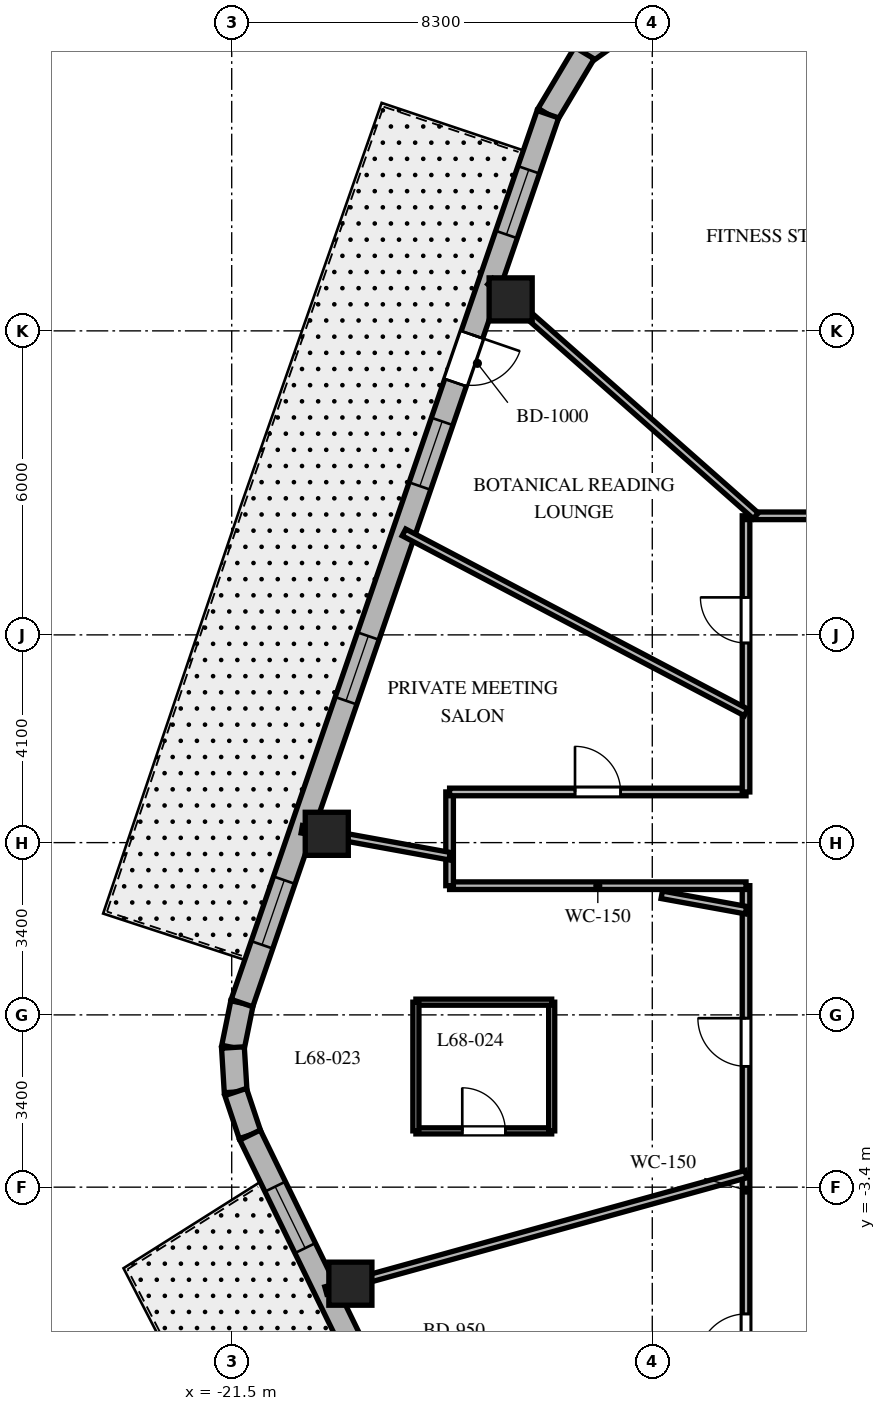
"""IFC4 building model, lengths in metres.
Left out: names, types, materials, properties, quantities, classifications, styles, units other than length and angle.
Written with IfcOpenShell. Run it as: python <this file> out.ifc"""

import sys

from ifc_helpers import new_model, si_unit, direction, frame, frame_2d, origin, origin_2d, place, context, subcontext, project, spatial, rectangle, extrude, element, fill, save


model = new_model("IFC4")
c1 = context("Model", 3, precision=1e-05, world=origin(), true_north=direction((0.0, 1.0)))
c2 = subcontext(c1, "Body", "Model", "MODEL_VIEW")
j1 = project(units=[si_unit("LENGTHUNIT", "METRE"), si_unit("PLANEANGLEUNIT", "RADIAN")], contexts=[c1])
p1 = place(None, origin())
s1 = spatial("IfcSite", under=j1, at=p1, CompositionType="ELEMENT")
p2 = place(p1, origin())
s2 = spatial("IfcBuilding", under=s1, at=p2, CompositionType="ELEMENT")
p3 = place(p2, frame((0.0, 0.0, 273.0)))
s3 = spatial("IfcBuildingStorey", under=s2, at=p3, CompositionType="ELEMENT", Elevation=273.0)
for number, where, z_axis, x_axis in (
    (1, (-15.995, 14.121, 0.0), (0.0, 0.0, 1.0), (1.0, 0.0, 0.0)),
    (2, (-19.624, 3.574, 0.0), (0.0, 0.0, 1.0), (1.0, 0.0, 0.0)),
    (3, (-19.158, -5.305, 0.0), (0.0, 0.0, 1.0), (1.0, 0.0, 0.0)),
):
    element("IfcColumn", number, at=place(p3, frame(where, z_axis=z_axis, x_axis=x_axis)), inside=s3, PredefinedType="COLUMN", context=c2, shape_type="SweptSolid", body=[
        extrude(rectangle(XDim=0.85, YDim=0.85, at=origin_2d()), origin(), (0.0, 0.0, 1.0), 3.9),
    ])
p4 = place(p3, frame((-13.415, 19.787, 0.0), z_axis=(0.0, 0.0, 1.0), x_axis=(-0.814055493997, -0.580787097561, 0.0)))
e4 = element("IfcWall", 4, at=p4, inside=s3, PredefinedType="SOLIDWALL", context=c2, shape_type="SweptSolid", body=[
    extrude(rectangle(XDim=1.383, YDim=0.45, at=frame_2d((0.691, 0.0))), origin(), (0.0, 0.0, 1.0), 3.6),
])
p5 = place(p3, frame((-14.54, 18.984, 0.0), z_axis=(0.0, 0.0, 1.0), x_axis=(-0.512374906623, -0.858761873317, 0.0)))
e5 = element("IfcWall", 5, at=p5, inside=s3, PredefinedType="SOLIDWALL", context=c2, shape_type="SweptSolid", body=[
    extrude(rectangle(XDim=1.406, YDim=0.45, at=frame_2d((0.703, 0.0))), origin(), (0.0, 0.0, 1.0), 3.6),
])
p6 = place(p3, frame((-21.298, 0.233, 0.0), z_axis=(0.0, 0.0, 1.0), x_axis=(-0.199158176661, -0.979967356941, 0.0)))
e6 = element("IfcWall", 6, at=p6, inside=s3, PredefinedType="SOLIDWALL", context=c2, shape_type="SweptSolid", body=[
    extrude(rectangle(XDim=0.895, YDim=0.45, at=frame_2d((0.447, 0.0))), origin(), (0.0, 0.0, 1.0), 3.6),
])
p7 = place(p3, frame((-21.476, -0.644, 0.0), z_axis=(0.0, 0.0, 1.0), x_axis=(0.061031097918, -0.998135865044, 0.0)))
e7 = element("IfcWall", 7, at=p7, inside=s3, PredefinedType="SOLIDWALL", context=c2, shape_type="SweptSolid", body=[
    extrude(rectangle(XDim=0.88, YDim=0.45, at=frame_2d((0.44, 0.0))), origin(), (0.0, 0.0, 1.0), 3.6),
])
p8 = place(p3, frame((-21.422, -1.522, 0.0), z_axis=(0.0, 0.0, 1.0), x_axis=(0.316964162323, -0.94843751497, 0.0)))
e8 = element("IfcWall", 8, at=p8, inside=s3, PredefinedType="SOLIDWALL", context=c2, shape_type="SweptSolid", body=[
    extrude(rectangle(XDim=0.895, YDim=0.45, at=frame_2d((0.448, 0.0))), origin(), (0.0, 0.0, 1.0), 3.6),
])
p9 = place(p3, frame((-15.26, 17.776, 0.0), z_axis=(0.0, 0.0, 1.0), x_axis=(-0.325407437101, -0.945573899745, 0.0)))
e9 = element("IfcWall", 9, at=p9, inside=s3, PredefinedType="SOLIDWALL", context=c2, shape_type="SweptSolid", body=[
    extrude(rectangle(XDim=18.552, YDim=0.45, at=frame_2d((9.276, 0.0))), origin(), (0.0, 0.0, 1.0), 3.6),
])
p10 = place(p9, frame((4.602, 0.0, 0.0)))
e10 = element("IfcOpeningElement", 10, at=p10, cuts=e9, PredefinedType="OPENING", context=c2, shape_type="SweptSolid", body=[
    extrude(rectangle(XDim=1.0, YDim=2.15, at=frame_2d((0.5, 1.075))), frame((0.0, 0.235, 0.0), z_axis=(0.0, -1.0, 0.0), x_axis=(1.0, 0.0, 0.0)), (0.0, 0.0, 1.0), 0.47),
])
p11 = place(p9, frame((1.161, 0.0, 0.8)))
e11 = element("IfcOpeningElement", 11, at=p11, cuts=e9, PredefinedType="OPENING", context=c2, shape_type="SweptSolid", body=[
    extrude(rectangle(XDim=1.35, YDim=1.75, at=frame_2d((0.675, 0.875))), frame((0.0, 0.235, 0.0), z_axis=(0.0, -1.0, 0.0), x_axis=(1.0, 0.0, 0.0)), (0.0, 0.0, 1.0), 0.47),
])
p12 = place(p9, frame((6.412, 0.0, 0.8)))
e12 = element("IfcOpeningElement", 12, at=p12, cuts=e9, PredefinedType="OPENING", context=c2, shape_type="SweptSolid", body=[
    extrude(rectangle(XDim=1.35, YDim=1.75, at=frame_2d((0.675, 0.875))), frame((0.0, 0.235, 0.0), z_axis=(0.0, -1.0, 0.0), x_axis=(1.0, 0.0, 0.0)), (0.0, 0.0, 1.0), 0.47),
])
p13 = place(p9, frame((10.892, 0.0, 0.8)))
e13 = element("IfcOpeningElement", 13, at=p13, cuts=e9, PredefinedType="OPENING", context=c2, shape_type="SweptSolid", body=[
    extrude(rectangle(XDim=1.35, YDim=1.75, at=frame_2d((0.675, 0.875))), frame((0.0, 0.235, 0.0), z_axis=(0.0, -1.0, 0.0), x_axis=(1.0, 0.0, 0.0)), (0.0, 0.0, 1.0), 0.47),
])
p14 = place(p9, frame((15.987, 0.0, 0.8)))
e14 = element("IfcOpeningElement", 14, at=p14, cuts=e9, PredefinedType="OPENING", context=c2, shape_type="SweptSolid", body=[
    extrude(rectangle(XDim=1.35, YDim=1.75, at=frame_2d((0.675, 0.875))), frame((0.0, 0.235, 0.0), z_axis=(0.0, -1.0, 0.0), x_axis=(1.0, 0.0, 0.0)), (0.0, 0.0, 1.0), 0.47),
])
p15 = place(p3, frame((-21.138, -2.371, 0.0), z_axis=(0.0, 0.0, 1.0), x_axis=(0.438128124058, -0.89891253574, 0.0)))
e15 = element("IfcWall", 15, at=p15, inside=s3, PredefinedType="SOLIDWALL", context=c2, shape_type="SweptSolid", body=[
    extrude(rectangle(XDim=17.565, YDim=0.45, at=frame_2d((8.782, 0.0))), origin(), (0.0, 0.0, 1.0), 3.6),
])
p16 = place(p15, frame((4.769, 0.0, 0.0)))
e16 = element("IfcOpeningElement", 16, at=p16, cuts=e15, PredefinedType="OPENING", context=c2, shape_type="SweptSolid", body=[
    extrude(rectangle(XDim=0.95, YDim=2.15, at=frame_2d((0.475, 1.075))), frame((0.0, 0.235, 0.0), z_axis=(0.0, -1.0, 0.0), x_axis=(1.0, 0.0, 0.0)), (0.0, 0.0, 1.0), 0.47),
])
p17 = place(p15, frame((1.133, 0.0, 0.8)))
e17 = element("IfcOpeningElement", 17, at=p17, cuts=e15, PredefinedType="OPENING", context=c2, shape_type="SweptSolid", body=[
    extrude(rectangle(XDim=1.35, YDim=1.75, at=frame_2d((0.675, 0.875))), frame((0.0, 0.235, 0.0), z_axis=(0.0, -1.0, 0.0), x_axis=(1.0, 0.0, 0.0)), (0.0, 0.0, 1.0), 0.47),
])
p18 = place(p15, frame((8.158, 0.0, 0.8)))
e18 = element("IfcOpeningElement", 18, at=p18, cuts=e15, PredefinedType="OPENING", context=c2, shape_type="SweptSolid", body=[
    extrude(rectangle(XDim=1.35, YDim=1.75, at=frame_2d((0.675, 0.875))), frame((0.0, 0.235, 0.0), z_axis=(0.0, -1.0, 0.0), x_axis=(1.0, 0.0, 0.0)), (0.0, 0.0, 1.0), 0.47),
])
p19 = place(p15, frame((15.132, 0.0, 0.8)))
e19 = element("IfcOpeningElement", 19, at=p19, cuts=e15, PredefinedType="OPENING", context=c2, shape_type="SweptSolid", body=[
    extrude(rectangle(XDim=1.35, YDim=1.75, at=frame_2d((0.675, 0.875))), frame((0.0, 0.235, 0.0), z_axis=(0.0, -1.0, 0.0), x_axis=(1.0, 0.0, 0.0)), (0.0, 0.0, 1.0), 0.47),
])
p20 = place(p3, frame((-11.35, -9.85, 0.0), z_axis=(0.0, 0.0, 1.0), x_axis=(0.0, 1.0, 0.0)))
e20 = element("IfcWall", 20, at=p20, inside=s3, PredefinedType="PARTITIONING", context=c2, shape_type="SweptSolid", body=[
    extrude(rectangle(XDim=12.4, YDim=0.15, at=frame_2d((6.2, 0.0))), origin(), (0.0, 0.0, 1.0), 3.09),
])
p21 = place(p20, frame((8.835, 0.0, 0.0)))
e21 = element("IfcOpeningElement", 21, at=p21, cuts=e20, PredefinedType="OPENING", context=c2, shape_type="SweptSolid", body=[
    extrude(rectangle(XDim=0.95, YDim=2.03, at=frame_2d((0.475, 1.015))), frame((0.0, 0.085, 0.0), z_axis=(0.0, -1.0, 0.0), x_axis=(1.0, 0.0, 0.0)), (0.0, 0.0, 1.0), 0.17),
])
p22 = place(p20, frame((2.998, 0.0, 0.0)))
e22 = element("IfcOpeningElement", 22, at=p22, cuts=e20, PredefinedType="OPENING", context=c2, shape_type="SweptSolid", body=[
    extrude(rectangle(XDim=0.95, YDim=2.03, at=frame_2d((0.475, 1.015))), frame((0.0, 0.085, 0.0), z_axis=(0.0, -1.0, 0.0), x_axis=(1.0, 0.0, 0.0)), (0.0, 0.0, 1.0), 0.17),
])
p23 = place(p3, frame((-11.35, 2.55, 0.0), z_axis=(0.0, 0.0, 1.0), x_axis=(-1.0, 0.0, 0.0)))
e23 = element("IfcWall", 23, at=p23, inside=s3, PredefinedType="PARTITIONING", context=c2, shape_type="SweptSolid", body=[
    extrude(rectangle(XDim=5.85, YDim=0.15, at=frame_2d((2.925, 0.0))), origin(), (0.0, 0.0, 1.0), 3.041),
])
p24 = place(p3, frame((-17.2, 2.55, 0.0), z_axis=(0.0, 0.0, 1.0), x_axis=(0.0, 1.0, 0.0)))
e24 = element("IfcWall", 24, at=p24, inside=s3, PredefinedType="PARTITIONING", context=c2, shape_type="SweptSolid", body=[
    extrude(rectangle(XDim=1.85, YDim=0.15, at=frame_2d((0.925, 0.0))), origin(), (0.0, 0.0, 1.0), 3.09),
])
p25 = place(p3, frame((-17.2, 4.4, 0.0), z_axis=(0.0, 0.0, 1.0), x_axis=(1.0, 0.0, 0.0)))
e25 = element("IfcWall", 25, at=p25, inside=s3, PredefinedType="PARTITIONING", context=c2, shape_type="SweptSolid", body=[
    extrude(rectangle(XDim=5.85, YDim=0.15, at=frame_2d((2.925, 0.0))), origin(), (0.0, 0.0, 1.0), 3.041),
])
p26 = place(p25, frame((2.475, 0.0, 0.0)))
e26 = element("IfcOpeningElement", 26, at=p26, cuts=e25, PredefinedType="OPENING", context=c2, shape_type="SweptSolid", body=[
    extrude(rectangle(XDim=0.9, YDim=2.03, at=frame_2d((0.45, 1.015))), frame((0.0, 0.085, 0.0), z_axis=(0.0, -1.0, 0.0), x_axis=(1.0, 0.0, 0.0)), (0.0, 0.0, 1.0), 0.17),
])
p27 = place(p3, frame((-11.35, 4.4, 0.0), z_axis=(0.0, 0.0, 1.0), x_axis=(0.0, 1.0, 0.0)))
e27 = element("IfcWall", 27, at=p27, inside=s3, PredefinedType="PARTITIONING", context=c2, shape_type="SweptSolid", body=[
    extrude(rectangle(XDim=5.45, YDim=0.15, at=frame_2d((2.725, 0.0))), origin(), (0.0, 0.0, 1.0), 3.09),
])
p28 = place(p27, frame((2.94, 0.0, 0.0)))
e28 = element("IfcOpeningElement", 28, at=p28, cuts=e27, PredefinedType="OPENING", context=c2, shape_type="SweptSolid", body=[
    extrude(rectangle(XDim=0.9, YDim=2.03, at=frame_2d((0.45, 1.015))), frame((0.0, 0.085, 0.0), z_axis=(0.0, -1.0, 0.0), x_axis=(1.0, 0.0, 0.0)), (0.0, 0.0, 1.0), 0.17),
])
p29 = place(p3, frame((-11.35, 9.85, 0.0), z_axis=(0.0, 0.0, 1.0), x_axis=(1.0, 0.0, 0.0)))
e29 = element("IfcWall", 29, at=p29, inside=s3, PredefinedType="PARTITIONING", context=c2, shape_type="SweptSolid", body=[
    extrude(rectangle(XDim=10.43, YDim=0.15, at=frame_2d((5.215, 0.0))), origin(), (0.0, 0.0, 1.0), 3.09),
])
p30 = place(p29, frame((8.407, 0.0, 0.0)))
e30 = element("IfcOpeningElement", 30, at=p30, cuts=e29, PredefinedType="OPENING", context=c2, shape_type="SweptSolid", body=[
    extrude(rectangle(XDim=0.9, YDim=2.03, at=frame_2d((0.45, 1.015))), frame((0.0, 0.085, 0.0), z_axis=(0.0, -1.0, 0.0), x_axis=(1.0, 0.0, 0.0)), (0.0, 0.0, 1.0), 0.17),
])
p31 = place(p29, frame((3.416, 0.0, 0.0)))
e31 = element("IfcOpeningElement", 31, at=p31, cuts=e29, PredefinedType="OPENING", context=c2, shape_type="SweptSolid", body=[
    extrude(rectangle(XDim=0.95, YDim=2.03, at=frame_2d((0.475, 1.015))), frame((0.0, 0.085, 0.0), z_axis=(0.0, -1.0, 0.0), x_axis=(1.0, 0.0, 0.0)), (0.0, 0.0, 1.0), 0.17),
])
p32 = place(p3, frame((-11.157, 9.85, 0.0), z_axis=(0.0, 0.0, 1.0), x_axis=(-0.74966962095, 0.661812253909, 0.0)))
e32 = element("IfcWall", 32, at=p32, inside=s3, PredefinedType="PARTITIONING", context=c2, shape_type="SweptSolid", body=[
    extrude(rectangle(XDim=6.989, YDim=0.15, at=frame_2d((3.494, 0.0))), origin(), (0.0, 0.0, 1.0), 2.94),
])
p33 = place(p3, frame((-11.35, 5.971, 0.0), z_axis=(0.0, 0.0, 1.0), x_axis=(-0.884999439042, 0.465592088523, 0.0)))
e33 = element("IfcWall", 33, at=p33, inside=s3, PredefinedType="PARTITIONING", context=c2, shape_type="SweptSolid", body=[
    extrude(rectangle(XDim=7.628, YDim=0.15, at=frame_2d((3.814, 0.0))), origin(), (0.0, 0.0, 1.0), 2.94),
])
p34 = place(p3, frame((-11.35, 2.067, 0.0), z_axis=(0.0, 0.0, 1.0), x_axis=(-0.983807459651, 0.179228575665, 0.0)))
e34 = element("IfcWall", 34, at=p34, inside=s3, PredefinedType="PARTITIONING", context=c2, shape_type="SweptSolid", body=[
    extrude(rectangle(XDim=1.69, YDim=0.15, at=frame_2d((0.845, 0.0))), origin(), (0.0, 0.0, 1.0), 3.6),
])
p35 = place(p3, frame((-17.2, 3.133, 0.0), z_axis=(0.0, 0.0, 1.0), x_axis=(-0.983817168797, 0.179175272791, 0.0)))
e35 = element("IfcWall", 35, at=p35, inside=s3, PredefinedType="PARTITIONING", context=c2, shape_type="SweptSolid", body=[
    extrude(rectangle(XDim=2.965, YDim=0.15, at=frame_2d((1.482, 0.0))), origin(), (0.0, 0.0, 1.0), 2.94),
])
p36 = place(p3, frame((-11.35, -3.143, 0.0), z_axis=(0.0, 0.0, 1.0), x_axis=(-0.963731818141, -0.266872596386, 0.0)))
e36 = element("IfcWall", 36, at=p36, inside=s3, PredefinedType="PARTITIONING", context=c2, shape_type="SweptSolid", body=[
    extrude(rectangle(XDim=8.605, YDim=0.15, at=frame_2d((4.302, 0.0))), origin(), (0.0, 0.0, 1.0), 2.94),
])
p37 = place(p3, frame((-17.865, -2.289, 0.0), z_axis=(0.0, 0.0, 1.0), x_axis=(1.0, 0.0, 0.0)))
e37 = element("IfcWall", 37, at=p37, inside=s3, PredefinedType="PARTITIONING", context=c2, shape_type="SweptSolid", body=[
    extrude(rectangle(XDim=2.68, YDim=0.12, at=frame_2d((1.34, 0.0))), origin(), (0.0, 0.0, 1.0), 3.041),
])
p38 = place(p37, frame((0.915, 0.0, 0.0)))
e38 = element("IfcOpeningElement", 38, at=p38, cuts=e37, PredefinedType="OPENING", context=c2, shape_type="SweptSolid", body=[
    extrude(rectangle(XDim=0.85, YDim=2.03, at=frame_2d((0.425, 1.015))), frame((0.0, 0.07, 0.0), z_axis=(0.0, -1.0, 0.0), x_axis=(1.0, 0.0, 0.0)), (0.0, 0.0, 1.0), 0.14),
])
p39 = place(p3, frame((-15.185, -2.289, 0.0), z_axis=(0.0, 0.0, 1.0), x_axis=(0.0, 1.0, 0.0)))
e39 = element("IfcWall", 39, at=p39, inside=s3, PredefinedType="PARTITIONING", context=c2, shape_type="SweptSolid", body=[
    extrude(rectangle(XDim=2.54, YDim=0.12, at=frame_2d((1.27, 0.0))), origin(), (0.0, 0.0, 1.0), 3.6),
])
p40 = place(p3, frame((-15.185, 0.251, 0.0), z_axis=(0.0, 0.0, 1.0), x_axis=(-1.0, 0.0, 0.0)))
e40 = element("IfcWall", 40, at=p40, inside=s3, PredefinedType="PARTITIONING", context=c2, shape_type="SweptSolid", body=[
    extrude(rectangle(XDim=2.68, YDim=0.12, at=frame_2d((1.34, 0.0))), origin(), (0.0, 0.0, 1.0), 3.041),
])
p41 = place(p3, frame((-17.865, 0.251, 0.0), z_axis=(0.0, 0.0, 1.0), x_axis=(0.0, -1.0, 0.0)))
e41 = element("IfcWall", 41, at=p41, inside=s3, PredefinedType="PARTITIONING", context=c2, shape_type="SweptSolid", body=[
    extrude(rectangle(XDim=2.54, YDim=0.12, at=frame_2d((1.27, 0.0))), origin(), (0.0, 0.0, 1.0), 3.6),
])
p42 = place(p10, origin())
e42 = element("IfcDoor", 42, at=p42, inside=s3, OperationType="SINGLE_SWING_LEFT", PredefinedType="DOOR", context=c2, shape_type="SweptSolid", body=[
    extrude(rectangle(XDim=1.0, YDim=2.15, at=frame_2d((0.5, 1.075))), frame((0.0, 0.025, 0.0), z_axis=(0.0, -1.0, 0.0), x_axis=(1.0, 0.0, 0.0)), (0.0, 0.0, 1.0), 0.05),
])
fill(e10, e42)
p43 = place(p11, origin())
e43 = element("IfcWindow", 43, at=p43, inside=s3, PartitioningType="SINGLE_PANEL", PredefinedType="WINDOW", context=c2, shape_type="SweptSolid", body=[
    extrude(rectangle(XDim=1.35, YDim=1.75, at=frame_2d((0.675, 0.875))), frame((0.0, 0.03, 0.0), z_axis=(0.0, -1.0, 0.0), x_axis=(1.0, 0.0, 0.0)), (0.0, 0.0, 1.0), 0.06),
])
fill(e11, e43)
p44 = place(p12, origin())
e44 = element("IfcWindow", 44, at=p44, inside=s3, PartitioningType="SINGLE_PANEL", PredefinedType="WINDOW", context=c2, shape_type="SweptSolid", body=[
    extrude(rectangle(XDim=1.35, YDim=1.75, at=frame_2d((0.675, 0.875))), frame((0.0, 0.03, 0.0), z_axis=(0.0, -1.0, 0.0), x_axis=(1.0, 0.0, 0.0)), (0.0, 0.0, 1.0), 0.06),
])
fill(e12, e44)
p45 = place(p13, origin())
e45 = element("IfcWindow", 45, at=p45, inside=s3, PartitioningType="SINGLE_PANEL", PredefinedType="WINDOW", context=c2, shape_type="SweptSolid", body=[
    extrude(rectangle(XDim=1.35, YDim=1.75, at=frame_2d((0.675, 0.875))), frame((0.0, 0.03, 0.0), z_axis=(0.0, -1.0, 0.0), x_axis=(1.0, 0.0, 0.0)), (0.0, 0.0, 1.0), 0.06),
])
fill(e13, e45)
p46 = place(p14, origin())
e46 = element("IfcWindow", 46, at=p46, inside=s3, PartitioningType="SINGLE_PANEL", PredefinedType="WINDOW", context=c2, shape_type="SweptSolid", body=[
    extrude(rectangle(XDim=1.35, YDim=1.75, at=frame_2d((0.675, 0.875))), frame((0.0, 0.03, 0.0), z_axis=(0.0, -1.0, 0.0), x_axis=(1.0, 0.0, 0.0)), (0.0, 0.0, 1.0), 0.06),
])
fill(e14, e46)
p47 = place(p17, origin())
e47 = element("IfcWindow", 47, at=p47, inside=s3, PartitioningType="SINGLE_PANEL", PredefinedType="WINDOW", context=c2, shape_type="SweptSolid", body=[
    extrude(rectangle(XDim=1.35, YDim=1.75, at=frame_2d((0.675, 0.875))), frame((0.0, 0.03, 0.0), z_axis=(0.0, -1.0, 0.0), x_axis=(1.0, 0.0, 0.0)), (0.0, 0.0, 1.0), 0.06),
])
fill(e17, e47)
p48 = place(p28, origin())
e48 = element("IfcDoor", 48, at=p48, inside=s3, OperationType="SINGLE_SWING_RIGHT", PredefinedType="DOOR", context=c2, shape_type="SweptSolid", body=[
    extrude(rectangle(XDim=0.9, YDim=2.03, at=frame_2d((0.45, 1.015))), frame((0.0, 0.025, 0.0), z_axis=(0.0, -1.0, 0.0), x_axis=(1.0, 0.0, 0.0)), (0.0, 0.0, 1.0), 0.05),
])
fill(e28, e48)
p49 = place(p26, origin())
e49 = element("IfcDoor", 49, at=p49, inside=s3, OperationType="SINGLE_SWING_LEFT", PredefinedType="DOOR", context=c2, shape_type="SweptSolid", body=[
    extrude(rectangle(XDim=0.9, YDim=2.03, at=frame_2d((0.45, 1.015))), frame((0.0, 0.025, 0.0), z_axis=(0.0, -1.0, 0.0), x_axis=(1.0, 0.0, 0.0)), (0.0, 0.0, 1.0), 0.05),
])
fill(e26, e49)
p50 = place(p21, origin())
e50 = element("IfcDoor", 50, at=p50, inside=s3, OperationType="SINGLE_SWING_RIGHT", PredefinedType="DOOR", context=c2, shape_type="SweptSolid", body=[
    extrude(rectangle(XDim=0.95, YDim=2.03, at=frame_2d((0.475, 1.015))), frame((0.0, 0.025, 0.0), z_axis=(0.0, -1.0, 0.0), x_axis=(1.0, 0.0, 0.0)), (0.0, 0.0, 1.0), 0.05),
])
fill(e21, e50)
p51 = place(p38, origin())
e51 = element("IfcDoor", 51, at=p51, inside=s3, OperationType="SINGLE_SWING_LEFT", PredefinedType="DOOR", context=c2, shape_type="SweptSolid", body=[
    extrude(rectangle(XDim=0.85, YDim=2.03, at=frame_2d((0.425, 1.015))), frame((0.0, 0.025, 0.0), z_axis=(0.0, -1.0, 0.0), x_axis=(1.0, 0.0, 0.0)), (0.0, 0.0, 1.0), 0.05),
])
fill(e38, e51)
p52 = place(p22, origin())
e52 = element("IfcDoor", 52, at=p52, inside=s3, OperationType="SINGLE_SWING_LEFT", PredefinedType="DOOR", context=c2, shape_type="SweptSolid", body=[
    extrude(rectangle(XDim=0.95, YDim=2.03, at=frame_2d((0.475, 1.015))), frame((0.0, 0.025, 0.0), z_axis=(0.0, -1.0, 0.0), x_axis=(1.0, 0.0, 0.0)), (0.0, 0.0, 1.0), 0.05),
])
fill(e22, e52)
save(model, sys.argv[1])
